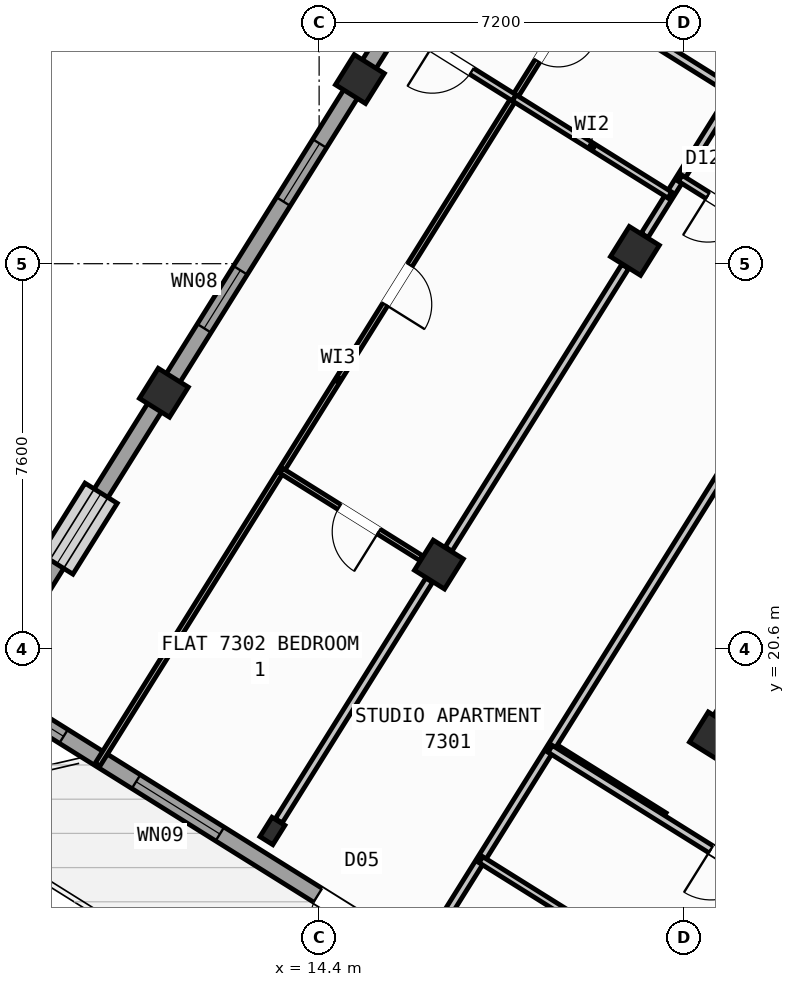
"""IFC4 building model, lengths in metres.
Left out: names, types, materials, properties, quantities, classifications, styles, units other than length and angle.
Written with IfcOpenShell. Run it as: python <this file> out.ifc"""

import sys

from ifc_helpers import new_model, si_unit, direction, frame, frame_2d, origin, origin_2d, place, context, subcontext, project, spatial, rectangle, hollow_rectangle, i_section, extrude, source, transform, mapped, element, fill, save


model = new_model("IFC4")
c1 = context("Model", 3, precision=1e-05, world=origin(), true_north=direction((0.0, 1.0)))
c2 = subcontext(c1, "Body", "Model", "MODEL_VIEW")
j1 = project(units=[si_unit("LENGTHUNIT", "METRE"), si_unit("PLANEANGLEUNIT", "RADIAN")], contexts=[c1])
p1 = place(None, origin())
s1 = spatial("IfcSite", under=j1, at=p1, CompositionType="ELEMENT")
p2 = place(p1, origin())
s2 = spatial("IfcBuilding", under=s1, at=p2, CompositionType="ELEMENT")
p3 = place(p2, frame((0.0, 0.0, 288.0)))
s3 = spatial("IfcBuildingStorey", under=s2, at=p3, CompositionType="ELEMENT", Elevation=288.0)
p4 = place(p3, frame((33.324, 12.503, 0.0), z_axis=(0.0, 0.0, 1.0), x_axis=(-0.848043529849, 0.529926571782, 0.0)))
e1 = element("IfcWall", 1, at=p4, inside=s3, PredefinedType="SHEAR", context=c2, shape_type="SweptSolid", body=[
    extrude(rectangle(XDim=13.04, YDim=0.45, at=frame_2d((6.52, 0.0))), origin(), (0.0, 0.0, 1.0), 3.35),
])
m1 = source(origin(), c2, "Body", "SweptSolid", [
    extrude(hollow_rectangle(XDim=0.7, YDim=0.7, WallThickness=0.028, at=origin_2d()), origin(), (0.0, 0.0, 1.0), 3.6),
])
for number, where, z_axis, x_axis in (
    (2, (22.191, 18.87, 0.0), (0.0, 0.0, 1.0), (-0.848, 0.53, 0.0)),
    (3, (20.632, 28.452, 0.0), (0.0, 0.0, 1.0), (-0.848, 0.53, 0.0)),
    (4, (16.764, 22.261, 0.0), (0.0, 0.0, 1.0), (-0.848, 0.53, 0.0)),
):
    element("IfcColumn", number, at=place(p3, frame(where, z_axis=z_axis, x_axis=x_axis)), inside=s3, PredefinedType="COLUMN", context=c2, shape_type="MappedRepresentation", body=[
        mapped(m1, transform((0.0, 0.0, 0.0), scale=1.0)),
    ])
m2 = source(origin(), c2, "Body", "SweptSolid", [
    extrude(i_section(OverallWidth=0.3, OverallDepth=0.45, WebThickness=0.014, FlangeThickness=0.026, at=origin_2d()), origin(), (0.0, 0.0, 1.0), 3.6),
])
p5 = place(p3, frame((13.478, 17.003, 0.0), z_axis=(0.0, 0.0, 1.0), x_axis=(-0.848048096156, 0.529919264233, 0.0)))
e5 = element("IfcColumn", 5, at=p5, inside=s3, PredefinedType="COLUMN", context=c2, shape_type="MappedRepresentation", body=[
    mapped(m2, transform((0.0, 0.0, 0.0), scale=1.0)),
])
for number, where, z_axis, x_axis in (
    (6, (15.205, 31.844, 0.0), (0.0, 0.0, 1.0), (-0.848, 0.53, 0.0)),
    (7, (11.336, 25.653, 0.0), (0.0, 0.0, 1.0), (-0.848, 0.53, 0.0)),
):
    element("IfcColumn", number, at=place(p3, frame(where, z_axis=z_axis, x_axis=x_axis)), inside=s3, PredefinedType="COLUMN", context=c2, shape_type="MappedRepresentation", body=[
        mapped(m1, transform((0.0, 0.0, 0.0), scale=1.0)),
    ])
p6 = place(p3, frame((29.268, 6.429, 0.0), z_axis=(0.0, 0.0, 1.0), x_axis=(-0.848048398186, 0.529918780885, 0.0)))
e8 = element("IfcWall", 8, at=p6, inside=s3, PredefinedType="STANDARD", context=c2, shape_type="SweptSolid", body=[
    extrude(rectangle(XDim=25.188, YDim=0.32, at=frame_2d((12.594, 0.0))), origin(), (0.0, 0.0, 1.0), 3.35),
])
p7 = place(p6, frame((16.362, 0.0, 0.0)))
e9 = element("IfcOpeningElement", 9, at=p7, cuts=e8, PredefinedType="OPENING", context=c2, shape_type="SweptSolid", body=[
    extrude(rectangle(XDim=1.2, YDim=2.15, at=frame_2d((0.6, 1.075))), frame((0.0, 0.17, 0.0), z_axis=(0.0, -1.0, 0.0), x_axis=(1.0, 0.0, 0.0)), (0.0, 0.0, 1.0), 0.34),
])
p8 = place(p6, frame((3.859, 0.0, 0.9)))
e10 = element("IfcOpeningElement", 10, at=p8, cuts=e8, PredefinedType="OPENING", context=c2, shape_type="SweptSolid", body=[
    extrude(rectangle(XDim=1.65, YDim=1.45, at=frame_2d((0.825, 0.725))), frame((0.0, 0.17, 0.0), z_axis=(0.0, -1.0, 0.0), x_axis=(1.0, 0.0, 0.0)), (0.0, 0.0, 1.0), 0.34),
])
p9 = place(p6, frame((10.519, 0.0, 0.9)))
e11 = element("IfcOpeningElement", 11, at=p9, cuts=e8, PredefinedType="OPENING", context=c2, shape_type="SweptSolid", body=[
    extrude(rectangle(XDim=1.65, YDim=1.45, at=frame_2d((0.825, 0.725))), frame((0.0, 0.17, 0.0), z_axis=(0.0, -1.0, 0.0), x_axis=(1.0, 0.0, 0.0)), (0.0, 0.0, 1.0), 0.34),
])
p10 = place(p6, frame((19.841, 0.0, 0.95)))
e12 = element("IfcOpeningElement", 12, at=p10, cuts=e8, PredefinedType="OPENING", context=c2, shape_type="SweptSolid", body=[
    extrude(rectangle(XDim=1.95, YDim=1.35, at=frame_2d((0.975, 0.675))), frame((0.0, 0.17, 0.0), z_axis=(0.0, -1.0, 0.0), x_axis=(1.0, 0.0, 0.0)), (0.0, 0.0, 1.0), 0.34),
])
p11 = place(p6, frame((23.478, 0.0, 1.0)))
e13 = element("IfcOpeningElement", 13, at=p11, cuts=e8, PredefinedType="OPENING", context=c2, shape_type="SweptSolid", body=[
    extrude(rectangle(XDim=0.9, YDim=1.25, at=frame_2d((0.45, 0.625))), frame((0.0, 0.17, 0.0), z_axis=(0.0, -1.0, 0.0), x_axis=(1.0, 0.0, 0.0)), (0.0, 0.0, 1.0), 0.34),
])
p12 = place(p3, frame((7.842, 20.061, 0.0), z_axis=(0.0, 0.0, 1.0), x_axis=(0.529915577903, 0.84805039962, 0.0)))
e14 = element("IfcWall", 14, at=p12, inside=s3, PredefinedType="STANDARD", context=c2, shape_type="SweptSolid", body=[
    extrude(rectangle(XDim=21.587, YDim=0.32, at=frame_2d((10.794, 0.0))), origin(), (0.0, 0.0, 1.0), 2.875),
])
p13 = place(p12, frame((2.606, 0.0, 0.9)))
e15 = element("IfcOpeningElement", 15, at=p13, cuts=e14, PredefinedType="OPENING", context=c2, shape_type="SweptSolid", body=[
    extrude(rectangle(XDim=1.65, YDim=1.45, at=frame_2d((0.825, 0.725))), frame((0.0, 0.17, 0.0), z_axis=(0.0, -1.0, 0.0), x_axis=(1.0, 0.0, 0.0)), (0.0, 0.0, 1.0), 0.34),
])
p14 = place(p12, frame((8.094, 0.0, 0.9)))
e16 = element("IfcOpeningElement", 16, at=p14, cuts=e14, PredefinedType="OPENING", context=c2, shape_type="SweptSolid", body=[
    extrude(rectangle(XDim=1.35, YDim=1.45, at=frame_2d((0.675, 0.725))), frame((0.0, 0.17, 0.0), z_axis=(0.0, -1.0, 0.0), x_axis=(1.0, 0.0, 0.0)), (0.0, 0.0, 1.0), 0.34),
])
p15 = place(p12, frame((11.044, 0.0, 0.9)))
e17 = element("IfcOpeningElement", 17, at=p15, cuts=e14, PredefinedType="OPENING", context=c2, shape_type="SweptSolid", body=[
    extrude(rectangle(XDim=1.35, YDim=1.45, at=frame_2d((0.675, 0.725))), frame((0.0, 0.17, 0.0), z_axis=(0.0, -1.0, 0.0), x_axis=(1.0, 0.0, 0.0)), (0.0, 0.0, 1.0), 0.34),
])
p16 = place(p12, frame((15.939, 0.0, 1.0)))
e18 = element("IfcOpeningElement", 18, at=p16, cuts=e14, PredefinedType="OPENING", context=c2, shape_type="SweptSolid", body=[
    extrude(rectangle(XDim=0.9, YDim=1.25, at=frame_2d((0.45, 0.625))), frame((0.0, 0.17, 0.0), z_axis=(0.0, -1.0, 0.0), x_axis=(1.0, 0.0, 0.0)), (0.0, 0.0, 1.0), 0.34),
])
p17 = place(p3, frame((19.566, 38.434, 0.0), z_axis=(0.0, 0.0, 1.0), x_axis=(0.84804567626, -0.529923136858, 0.0)))
e19 = element("IfcWall", 19, at=p17, inside=s3, PredefinedType="STANDARD", context=c2, shape_type="SweptSolid", body=[
    extrude(rectangle(XDim=25.188, YDim=0.32, at=frame_2d((12.594, 0.0))), origin(), (0.0, 0.0, 1.0), 3.35),
])
p18 = place(p17, frame((3.355, 0.0, 0.0)))
e20 = element("IfcOpeningElement", 20, at=p18, cuts=e19, PredefinedType="OPENING", context=c2, shape_type="SweptSolid", body=[
    extrude(rectangle(XDim=1.05, YDim=2.15, at=frame_2d((0.525, 1.075))), frame((0.0, 0.17, 0.0), z_axis=(0.0, -1.0, 0.0), x_axis=(1.0, 0.0, 0.0)), (0.0, 0.0, 1.0), 0.34),
])
p19 = place(p17, frame((0.939, 0.0, 0.9)))
e21 = element("IfcOpeningElement", 21, at=p19, cuts=e19, PredefinedType="OPENING", context=c2, shape_type="SweptSolid", body=[
    extrude(rectangle(XDim=1.65, YDim=1.45, at=frame_2d((0.825, 0.725))), frame((0.0, 0.17, 0.0), z_axis=(0.0, -1.0, 0.0), x_axis=(1.0, 0.0, 0.0)), (0.0, 0.0, 1.0), 0.34),
])
p20 = place(p17, frame((7.499, 0.0, 0.9)))
e22 = element("IfcOpeningElement", 22, at=p20, cuts=e19, PredefinedType="OPENING", context=c2, shape_type="SweptSolid", body=[
    extrude(rectangle(XDim=1.35, YDim=1.45, at=frame_2d((0.675, 0.725))), frame((0.0, 0.17, 0.0), z_axis=(0.0, -1.0, 0.0), x_axis=(1.0, 0.0, 0.0)), (0.0, 0.0, 1.0), 0.34),
])
p21 = place(p17, frame((10.754, 0.0, 1.0)))
e23 = element("IfcOpeningElement", 23, at=p21, cuts=e19, PredefinedType="OPENING", context=c2, shape_type="SweptSolid", body=[
    extrude(rectangle(XDim=0.9, YDim=1.25, at=frame_2d((0.45, 0.625))), frame((0.0, 0.17, 0.0), z_axis=(0.0, -1.0, 0.0), x_axis=(1.0, 0.0, 0.0)), (0.0, 0.0, 1.0), 0.34),
])
p22 = place(p17, frame((15.694, 0.0, 1.0)))
e24 = element("IfcOpeningElement", 24, at=p22, cuts=e19, PredefinedType="OPENING", context=c2, shape_type="SweptSolid", body=[
    extrude(rectangle(XDim=0.9, YDim=1.25, at=frame_2d((0.45, 0.625))), frame((0.0, 0.17, 0.0), z_axis=(0.0, -1.0, 0.0), x_axis=(1.0, 0.0, 0.0)), (0.0, 0.0, 1.0), 0.34),
])
p23 = place(p17, frame((21.394, 0.0, 1.0)))
e25 = element("IfcOpeningElement", 25, at=p23, cuts=e19, PredefinedType="OPENING", context=c2, shape_type="SweptSolid", body=[
    extrude(rectangle(XDim=0.9, YDim=1.25, at=frame_2d((0.45, 0.625))), frame((0.0, 0.17, 0.0), z_axis=(0.0, -1.0, 0.0), x_axis=(1.0, 0.0, 0.0)), (0.0, 0.0, 1.0), 0.34),
])
p24 = place(p3, frame((21.206, 17.292, 0.0), z_axis=(0.0, 0.0, 1.0), x_axis=(-0.848050851465, 0.529914854792, 0.0)))
e26 = element("IfcWall", 26, at=p24, inside=s3, PredefinedType="PARTITIONING", context=c2, shape_type="SweptSolid", body=[
    extrude(rectangle(XDim=2.61, YDim=0.16, at=frame_2d((1.305, 0.0))), origin(), (0.0, 0.0, 1.0), 3.34),
])
p25 = place(p3, frame((25.807, 29.582, 0.0), z_axis=(0.0, 0.0, 1.0), x_axis=(-0.529918119251, -0.84804881162, 0.0)))
e27 = element("IfcWall", 27, at=p25, inside=s3, PredefinedType="PARTITIONING", context=c2, shape_type="SweptSolid", body=[
    extrude(rectangle(XDim=17.65, YDim=0.16, at=frame_2d((8.825, 0.0))), origin(), (0.0, 0.0, 1.0), 3.34),
])
p26 = place(p3, frame((26.973, 31.447, 0.0), z_axis=(0.0, 0.0, 1.0), x_axis=(-0.84805406617, 0.529909710094, 0.0)))
e28 = element("IfcWall", 28, at=p26, inside=s3, PredefinedType="PARTITIONING", context=c2, shape_type="SweptSolid", body=[
    extrude(rectangle(XDim=10.33, YDim=0.16, at=frame_2d((5.165, 0.0))), origin(), (0.0, 0.0, 1.0), 3.34),
])
p27 = place(p26, frame((1.459, 0.0, 0.0)))
e29 = element("IfcOpeningElement", 29, at=p27, cuts=e28, PredefinedType="OPENING", context=c2, shape_type="SweptSolid", body=[
    extrude(rectangle(XDim=1.0, YDim=2.1, at=frame_2d((0.5, 1.05))), frame((0.0, 0.09, 0.0), z_axis=(0.0, -1.0, 0.0), x_axis=(1.0, 0.0, 0.0)), (0.0, 0.0, 1.0), 0.18),
])
p28 = place(p26, frame((6.614, 0.0, 0.0)))
e30 = element("IfcOpeningElement", 30, at=p28, cuts=e28, PredefinedType="OPENING", context=c2, shape_type="SweptSolid", body=[
    extrude(rectangle(XDim=1.0, YDim=2.1, at=frame_2d((0.5, 1.05))), frame((0.0, 0.09, 0.0), z_axis=(0.0, -1.0, 0.0), x_axis=(1.0, 0.0, 0.0)), (0.0, 0.0, 1.0), 0.18),
])
p29 = place(p3, frame((25.807, 29.582, 0.0), z_axis=(0.0, 0.0, 1.0), x_axis=(-0.848060702647, 0.529899089097, 0.0)))
e31 = element("IfcWall", 31, at=p29, inside=s3, PredefinedType="PARTITIONING", context=c2, shape_type="SweptSolid", body=[
    extrude(rectangle(XDim=10.33, YDim=0.16, at=frame_2d((5.165, 0.0))), origin(), (0.0, 0.0, 1.0), 3.34),
])
p30 = place(p29, frame((2.22, 0.0, 0.0)))
e32 = element("IfcOpeningElement", 32, at=p30, cuts=e31, PredefinedType="OPENING", context=c2, shape_type="SweptSolid", body=[
    extrude(rectangle(XDim=0.86, YDim=2.05, at=frame_2d((0.43, 1.025))), frame((0.0, 0.09, 0.0), z_axis=(0.0, -1.0, 0.0), x_axis=(1.0, 0.0, 0.0)), (0.0, 0.0, 1.0), 0.18),
])
p31 = place(p29, frame((8.36, 0.0, 0.0)))
e33 = element("IfcOpeningElement", 33, at=p31, cuts=e31, PredefinedType="OPENING", context=c2, shape_type="SweptSolid", body=[
    extrude(rectangle(XDim=1.0, YDim=2.1, at=frame_2d((0.5, 1.05))), frame((0.0, 0.09, 0.0), z_axis=(0.0, -1.0, 0.0), x_axis=(1.0, 0.0, 0.0)), (0.0, 0.0, 1.0), 0.18),
])
p32 = place(p3, frame((22.593, 31.59, 0.0), z_axis=(0.0, 0.0, 1.0), x_axis=(-0.529900320499, -0.848059933221, 0.0)))
e34 = element("IfcWall", 34, at=p32, inside=s3, PredefinedType="PARTITIONING", context=c2, shape_type="SweptSolid", body=[
    extrude(rectangle(XDim=3.338, YDim=0.16, at=frame_2d((1.669, 0.0))), origin(), (0.0, 0.0, 1.0), 2.875),
])
p33 = place(p3, frame((20.44, 28.145, 0.0), z_axis=(0.0, 0.0, 1.0), x_axis=(-0.529938869374, -0.84803584519, 0.0)))
e35 = element("IfcWall", 35, at=p33, inside=s3, PredefinedType="PARTITIONING", context=c2, shape_type="SweptSolid", body=[
    extrude(rectangle(XDim=6.576, YDim=0.16, at=frame_2d((3.288, 0.0))), origin(), (0.0, 0.0, 1.0), 2.875),
])
p34 = place(p3, frame((16.572, 21.954, 0.0), z_axis=(0.0, 0.0, 1.0), x_axis=(-0.529904903214, -0.848057069748, 0.0)))
e36 = element("IfcWall", 36, at=p34, inside=s3, PredefinedType="PARTITIONING", context=c2, shape_type="SweptSolid", body=[
    extrude(rectangle(XDim=5.601, YDim=0.16, at=frame_2d((2.801, 0.0))), origin(), (0.0, 0.0, 1.0), 2.875),
])
p35 = place(p3, frame((24.742, 27.877, 0.0), z_axis=(0.0, 0.0, 1.0), x_axis=(-0.848059820872, 0.529900500304, 0.0)))
e37 = element("IfcWall", 37, at=p35, inside=s3, PredefinedType="PLUMBINGWALL", context=c2, shape_type="SweptSolid", body=[
    extrude(rectangle(XDim=3.79, YDim=0.14, at=frame_2d((1.895, 0.0))), origin(), (0.0, 0.0, 1.0), 3.34),
])
p36 = place(p35, frame((2.23, 0.0, 0.0)))
e38 = element("IfcOpeningElement", 38, at=p36, cuts=e37, PredefinedType="OPENING", context=c2, shape_type="SweptSolid", body=[
    extrude(rectangle(XDim=0.92, YDim=2.08, at=frame_2d((0.46, 1.04))), frame((0.0, 0.08, 0.0), z_axis=(0.0, -1.0, 0.0), x_axis=(1.0, 0.0, 0.0)), (0.0, 0.0, 1.0), 0.16),
])
p37 = place(p3, frame((19.523, 33.508, 0.0), z_axis=(0.0, 0.0, 1.0), x_axis=(-0.529910765222, -0.848053406869, 0.0)))
e39 = element("IfcWall", 39, at=p37, inside=s3, PredefinedType="PARTITIONING", context=c2, shape_type="SweptSolid", body=[
    extrude(rectangle(XDim=17.92, YDim=0.11, at=frame_2d((8.96, 0.0))), origin(), (0.0, 0.0, 1.0), 3.34),
])
p38 = place(p37, frame((0.76, 0.0, 0.0)))
e40 = element("IfcOpeningElement", 40, at=p38, cuts=e39, PredefinedType="OPENING", context=c2, shape_type="SweptSolid", body=[
    extrude(rectangle(XDim=0.78, YDim=2.05, at=frame_2d((0.39, 1.025))), frame((0.0, 0.065, 0.0), z_axis=(0.0, -1.0, 0.0), x_axis=(1.0, 0.0, 0.0)), (0.0, 0.0, 1.0), 0.13),
])
p39 = place(p37, frame((6.289, 0.0, 0.0)))
e41 = element("IfcOpeningElement", 41, at=p39, cuts=e39, PredefinedType="OPENING", context=c2, shape_type="SweptSolid", body=[
    extrude(rectangle(XDim=0.92, YDim=2.08, at=frame_2d((0.46, 1.04))), frame((0.0, 0.065, 0.0), z_axis=(0.0, -1.0, 0.0), x_axis=(1.0, 0.0, 0.0)), (0.0, 0.0, 1.0), 0.13),
])
p40 = place(p3, frame((18.251, 31.473, 0.0), z_axis=(0.0, 0.0, 1.0), x_axis=(-0.848059786386, 0.529900555496, 0.0)))
e42 = element("IfcWall", 42, at=p40, inside=s3, PredefinedType="PLUMBINGWALL", context=c2, shape_type="SweptSolid", body=[
    extrude(rectangle(XDim=2.9, YDim=0.14, at=frame_2d((1.45, 0.0))), origin(), (0.0, 0.0, 1.0), 3.34),
])
p41 = place(p40, frame((0.99, 0.0, 0.0)))
e43 = element("IfcOpeningElement", 43, at=p41, cuts=e42, PredefinedType="OPENING", context=c2, shape_type="SweptSolid", body=[
    extrude(rectangle(XDim=0.92, YDim=2.08, at=frame_2d((0.46, 1.04))), frame((0.0, 0.08, 0.0), z_axis=(0.0, -1.0, 0.0), x_axis=(1.0, 0.0, 0.0)), (0.0, 0.0, 1.0), 0.16),
])
p42 = place(p3, frame((21.321, 29.554, 0.0), z_axis=(0.0, 0.0, 1.0), x_axis=(-0.848021036626, 0.529962566074, 0.0)))
e44 = element("IfcWall", 44, at=p42, inside=s3, PredefinedType="PLUMBINGWALL", context=c2, shape_type="SweptSolid", body=[
    extrude(rectangle(XDim=3.62, YDim=0.14, at=frame_2d((1.81, 0.0))), origin(), (0.0, 0.0, 1.0), 3.34),
])
p43 = place(p3, frame((16.416, 22.388, 0.0), z_axis=(0.0, 0.0, 1.0), x_axis=(-0.84806986598, 0.529884423641, 0.0)))
e45 = element("IfcWall", 45, at=p43, inside=s3, PredefinedType="PARTITIONING", context=c2, shape_type="SweptSolid", body=[
    extrude(rectangle(XDim=3.258, YDim=0.11, at=frame_2d((1.629, 0.0))), origin(), (0.0, 0.0, 1.0), 2.875),
])
p44 = place(p43, frame((0.988, 0.0, 0.0)))
e46 = element("IfcOpeningElement", 46, at=p44, cuts=e45, PredefinedType="OPENING", context=c2, shape_type="SweptSolid", body=[
    extrude(rectangle(XDim=0.92, YDim=2.08, at=frame_2d((0.46, 1.04))), frame((0.0, 0.065, 0.0), z_axis=(0.0, -1.0, 0.0), x_axis=(1.0, 0.0, 0.0)), (0.0, 0.0, 1.0), 0.13),
])
p45 = place(p3, frame((32.164, 10.374, 0.0), z_axis=(0.0, 0.0, 1.0), x_axis=(-0.848044107957, 0.529925646633, 0.0)))
e47 = element("IfcWall", 47, at=p45, inside=s3, PredefinedType="PARTITIONING", context=c2, shape_type="SweptSolid", body=[
    extrude(rectangle(XDim=15.57, YDim=0.16, at=frame_2d((7.785, 0.0))), origin(), (0.0, 0.0, 1.0), 3.34),
])
p46 = place(p45, frame((10.83, 0.0, 0.0)))
e48 = element("IfcOpeningElement", 48, at=p46, cuts=e47, PredefinedType="OPENING", context=c2, shape_type="SweptSolid", body=[
    extrude(rectangle(XDim=1.0, YDim=2.1, at=frame_2d((0.5, 1.05))), frame((0.0, 0.09, 0.0), z_axis=(0.0, -1.0, 0.0), x_axis=(1.0, 0.0, 0.0)), (0.0, 0.0, 1.0), 0.18),
])
p47 = place(p3, frame((29.72, 8.859, 0.0), z_axis=(0.0, 0.0, 1.0), x_axis=(-0.848049134363, 0.529917602752, 0.0)))
e49 = element("IfcWall", 49, at=p47, inside=s3, PredefinedType="PLUMBINGWALL", context=c2, shape_type="SweptSolid", body=[
    extrude(rectangle(XDim=14.3, YDim=0.14, at=frame_2d((7.15, 0.0))), origin(), (0.0, 0.0, 1.0), 3.34),
])
p48 = place(p47, frame((9.57, 0.0, 0.0)))
e50 = element("IfcOpeningElement", 50, at=p48, cuts=e49, PredefinedType="OPENING", context=c2, shape_type="SweptSolid", body=[
    extrude(rectangle(XDim=0.92, YDim=2.08, at=frame_2d((0.46, 1.04))), frame((0.0, 0.08, 0.0), z_axis=(0.0, -1.0, 0.0), x_axis=(1.0, 0.0, 0.0)), (0.0, 0.0, 1.0), 0.16),
])
m3 = source(origin(), c2, "Body", "SweptSolid", [
    extrude(rectangle(XDim=1.2, YDim=2.15, at=frame_2d((0.6, 1.075))), frame((0.0, 0.025, 0.0), z_axis=(0.0, -1.0, 0.0), x_axis=(1.0, 0.0, 0.0)), (0.0, 0.0, 1.0), 0.05),
])
p49 = place(p7, origin())
e51 = element("IfcDoor", 51, at=p49, inside=s3, OperationType="SINGLE_SWING_LEFT", PredefinedType="DOOR", context=c2, shape_type="MappedRepresentation", body=[
    mapped(m3, transform((0.0, 0.0, 0.0), scale=1.0)),
])
fill(e9, e51)
m4 = source(origin(), c2, "Body", "SweptSolid", [
    extrude(rectangle(XDim=1.95, YDim=1.35, at=frame_2d((0.975, 0.675))), frame((0.0, 0.03, 0.0), z_axis=(0.0, -1.0, 0.0), x_axis=(1.0, 0.0, 0.0)), (0.0, 0.0, 1.0), 0.06),
])
p50 = place(p10, origin())
e52 = element("IfcWindow", 52, at=p50, inside=s3, PartitioningType="SINGLE_PANEL", PredefinedType="WINDOW", context=c2, shape_type="MappedRepresentation", body=[
    mapped(m4, transform((0.0, 0.0, 0.0), scale=1.0)),
])
fill(e12, e52)
m5 = source(origin(), c2, "Body", "SweptSolid", [
    extrude(rectangle(XDim=0.9, YDim=1.25, at=frame_2d((0.45, 0.625))), frame((0.0, 0.03, 0.0), z_axis=(0.0, -1.0, 0.0), x_axis=(1.0, 0.0, 0.0)), (0.0, 0.0, 1.0), 0.06),
])
p51 = place(p11, origin())
e53 = element("IfcWindow", 53, at=p51, inside=s3, PartitioningType="SINGLE_PANEL", PredefinedType="WINDOW", context=c2, shape_type="MappedRepresentation", body=[
    mapped(m5, transform((0.0, 0.0, 0.0), scale=1.0)),
])
fill(e13, e53)
m6 = source(origin(), c2, "Body", "SweptSolid", [
    extrude(rectangle(XDim=1.65, YDim=1.45, at=frame_2d((0.825, 0.725))), frame((0.0, 0.03, 0.0), z_axis=(0.0, -1.0, 0.0), x_axis=(1.0, 0.0, 0.0)), (0.0, 0.0, 1.0), 0.06),
])
p52 = place(p13, origin())
e54 = element("IfcWindow", 54, at=p52, inside=s3, PartitioningType="SINGLE_PANEL", PredefinedType="WINDOW", context=c2, shape_type="MappedRepresentation", body=[
    mapped(m6, transform((0.0, 0.0, 0.0), scale=1.0)),
])
fill(e15, e54)
m7 = source(origin(), c2, "Body", "SweptSolid", [
    extrude(rectangle(XDim=1.35, YDim=1.45, at=frame_2d((0.675, 0.725))), frame((0.0, 0.03, 0.0), z_axis=(0.0, -1.0, 0.0), x_axis=(1.0, 0.0, 0.0)), (0.0, 0.0, 1.0), 0.06),
])
p53 = place(p14, origin())
e55 = element("IfcWindow", 55, at=p53, inside=s3, PartitioningType="SINGLE_PANEL", PredefinedType="WINDOW", context=c2, shape_type="MappedRepresentation", body=[
    mapped(m7, transform((0.0, 0.0, 0.0), scale=1.0)),
])
fill(e16, e55)
p54 = place(p15, origin())
e56 = element("IfcWindow", 56, at=p54, inside=s3, PartitioningType="SINGLE_PANEL", PredefinedType="WINDOW", context=c2, shape_type="MappedRepresentation", body=[
    mapped(m7, transform((0.0, 0.0, 0.0), scale=1.0)),
])
fill(e17, e56)
m8 = source(origin(), c2, "Body", "SweptSolid", [
    extrude(rectangle(XDim=0.92, YDim=2.08, at=frame_2d((0.46, 1.04))), frame((0.0, 0.025, 0.0), z_axis=(0.0, -1.0, 0.0), x_axis=(1.0, 0.0, 0.0)), (0.0, 0.0, 1.0), 0.05),
])
p55 = place(p36, origin())
e57 = element("IfcDoor", 57, at=p55, inside=s3, OperationType="SINGLE_SWING_RIGHT", PredefinedType="DOOR", context=c2, shape_type="MappedRepresentation", body=[
    mapped(m8, transform((0.0, 0.0, 0.0), scale=1.0)),
])
fill(e38, e57)
p56 = place(p41, origin())
e58 = element("IfcDoor", 58, at=p56, inside=s3, OperationType="SINGLE_SWING_RIGHT", PredefinedType="DOOR", context=c2, shape_type="MappedRepresentation", body=[
    mapped(m8, transform((0.0, 0.0, 0.0), scale=1.0)),
])
fill(e43, e58)
m9 = source(origin(), c2, "Body", "SweptSolid", [
    extrude(rectangle(XDim=0.78, YDim=2.05, at=frame_2d((0.39, 1.025))), frame((0.0, 0.025, 0.0), z_axis=(0.0, -1.0, 0.0), x_axis=(1.0, 0.0, 0.0)), (0.0, 0.0, 1.0), 0.05),
])
p57 = place(p38, origin())
e59 = element("IfcDoor", 59, at=p57, inside=s3, OperationType="SINGLE_SWING_LEFT", PredefinedType="DOOR", context=c2, shape_type="MappedRepresentation", body=[
    mapped(m9, transform((0.0, 0.0, 0.0), scale=1.0)),
])
fill(e40, e59)
p58 = place(p39, origin())
e60 = element("IfcDoor", 60, at=p58, inside=s3, OperationType="SINGLE_SWING_RIGHT", PredefinedType="DOOR", context=c2, shape_type="MappedRepresentation", body=[
    mapped(m8, transform((0.0, 0.0, 0.0), scale=1.0)),
])
fill(e41, e60)
p59 = place(p44, origin())
e61 = element("IfcDoor", 61, at=p59, inside=s3, OperationType="SINGLE_SWING_LEFT", PredefinedType="DOOR", context=c2, shape_type="MappedRepresentation", body=[
    mapped(m8, transform((0.0, 0.0, 0.0), scale=1.0)),
])
fill(e46, e61)
m10 = source(origin(), c2, "Body", "SweptSolid", [
    extrude(rectangle(XDim=1.0, YDim=2.1, at=frame_2d((0.5, 1.05))), frame((0.0, 0.025, 0.0), z_axis=(0.0, -1.0, 0.0), x_axis=(1.0, 0.0, 0.0)), (0.0, 0.0, 1.0), 0.05),
])
p60 = place(p46, origin())
e62 = element("IfcDoor", 62, at=p60, inside=s3, OperationType="SINGLE_SWING_RIGHT", PredefinedType="DOOR", context=c2, shape_type="MappedRepresentation", body=[
    mapped(m10, transform((0.0, 0.0, 0.0), scale=1.0)),
])
fill(e48, e62)
save(model, sys.argv[1])
